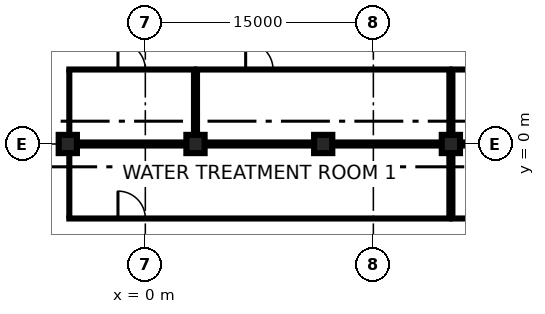
"""IFC4 building model, lengths in metres.
Left out: names, types, materials, properties, quantities, classifications, styles, units other than length and angle.
Written with IfcOpenShell. Run it as: python <this file> out.ifc"""

import sys

from ifc_helpers import new_model, si_unit, direction, frame, frame_2d, origin, origin_2d, place, context, subcontext, project, spatial, rectangle, extrude, element, fill, save


model = new_model("IFC4")
c1 = context("Model", 3, precision=1e-05, world=origin(), true_north=direction((0.0, 1.0)))
c2 = subcontext(c1, "Body", "Model", "MODEL_VIEW")
j1 = project(units=[si_unit("LENGTHUNIT", "METRE"), si_unit("PLANEANGLEUNIT", "RADIAN")], contexts=[c1])
p1 = place(None, origin())
s1 = spatial("IfcSite", under=j1, at=p1, CompositionType="ELEMENT")
p2 = place(p1, origin())
s2 = spatial("IfcBuilding", under=s1, at=p2, CompositionType="ELEMENT")
p3 = place(p2, frame((0.0, 0.0, -12.0)))
s3 = spatial("IfcBuildingStorey", under=s2, at=p3, CompositionType="ELEMENT", Elevation=-12.0)
for number, where, z_axis, x_axis in (
    (1, (-5.1, 0.0, 0.0), (0.0, 0.0, 1.0), (1.0, 0.0, 0.0)),
    (2, (3.3, 0.0, 0.0), (0.0, 0.0, 1.0), (1.0, 0.0, 0.0)),
    (3, (11.7, 0.0, 0.0), (0.0, 0.0, 1.0), (1.0, 0.0, 0.0)),
    (4, (20.1, 0.0, 0.0), (0.0, 0.0, 1.0), (1.0, 0.0, 0.0)),
):
    element("IfcColumn", number, at=place(p3, frame(where, z_axis=z_axis, x_axis=x_axis)), inside=s3, PredefinedType="COLUMN", context=c2, shape_type="SweptSolid", body=[
        extrude(rectangle(XDim=1.2, YDim=1.2, at=origin_2d()), origin(), (0.0, 0.0, 1.0), 4.4),
    ])
p4 = place(p3, frame((-5.1, -4.9, 0.0), z_axis=(0.0, 0.0, 1.0), x_axis=(1.0, 0.0, 0.0)))
e5 = element("IfcWall", 5, at=p4, inside=s3, PredefinedType="PARTITIONING", context=c2, shape_type="SweptSolid", body=[
    extrude(rectangle(XDim=25.2, YDim=0.2, at=frame_2d((12.6, 0.0))), origin(), (0.0, 0.0, 1.0), 4.4),
])
p5 = place(p4, frame((3.3, 0.0, 0.0)))
e6 = element("IfcOpeningElement", 6, at=p5, cuts=e5, PredefinedType="OPENING", context=c2, shape_type="SweptSolid", body=[
    extrude(rectangle(XDim=1.8, YDim=2.1, at=frame_2d((0.9, 1.05))), frame((0.0, 0.11, 0.0), z_axis=(0.0, -1.0, 0.0), x_axis=(1.0, 0.0, 0.0)), (0.0, 0.0, 1.0), 0.22),
])
p6 = place(p3, frame((-5.1, -0.1, 0.0), z_axis=(0.0, 0.0, 1.0), x_axis=(1.0, 0.0, 0.0)))
e7 = element("IfcWall", 7, at=p6, inside=s3, PredefinedType="PARTITIONING", context=c2, shape_type="SweptSolid", body=[
    extrude(rectangle(XDim=25.2, YDim=0.2, at=frame_2d((12.6, 0.0))), origin(), (0.0, 0.0, 1.0), 4.4),
])
for number, where, z_axis, x_axis in (
    (8, (-5.0, -4.8, 0.0), (0.0, 0.0, 1.0), (0.0, 1.0, 0.0)),
    (9, (20.0, -4.8, 0.0), (0.0, 0.0, 1.0), (0.0, 1.0, 0.0)),
):
    element("IfcWall", number, at=place(p3, frame(where, z_axis=z_axis, x_axis=x_axis)), inside=s3, PredefinedType="PARTITIONING", context=c2, shape_type="SweptSolid", body=[
        extrude(rectangle(XDim=4.2, YDim=0.2, at=frame_2d((2.1, 0.0))), origin(), (0.0, 0.0, 1.0), 4.4),
    ])
p7 = place(p3, frame((20.1, -4.9, 0.0), z_axis=(0.0, 0.0, 1.0), x_axis=(1.0, 0.0, 0.0)))
e10 = element("IfcWall", 10, at=p7, inside=s3, PredefinedType="PARTITIONING", context=c2, shape_type="SweptSolid", body=[
    extrude(rectangle(XDim=8.4, YDim=0.2, at=frame_2d((4.2, 0.0))), origin(), (0.0, 0.0, 1.0), 4.4),
])
p8 = place(p7, frame((3.3, 0.0, 0.0)))
e11 = element("IfcOpeningElement", 11, at=p8, cuts=e10, PredefinedType="OPENING", context=c2, shape_type="SweptSolid", body=[
    extrude(rectangle(XDim=1.8, YDim=2.1, at=frame_2d((0.9, 1.05))), frame((0.0, 0.11, 0.0), z_axis=(0.0, -1.0, 0.0), x_axis=(1.0, 0.0, 0.0)), (0.0, 0.0, 1.0), 0.22),
])
p9 = place(p3, frame((20.1, -0.1, 0.0), z_axis=(0.0, 0.0, 1.0), x_axis=(1.0, 0.0, 0.0)))
e12 = element("IfcWall", 12, at=p9, inside=s3, PredefinedType="PARTITIONING", context=c2, shape_type="SweptSolid", body=[
    extrude(rectangle(XDim=8.4, YDim=0.2, at=frame_2d((4.2, 0.0))), origin(), (0.0, 0.0, 1.0), 4.4),
])
p10 = place(p3, frame((20.2, -4.8, 0.0), z_axis=(0.0, 0.0, 1.0), x_axis=(0.0, 1.0, 0.0)))
e13 = element("IfcWall", 13, at=p10, inside=s3, PredefinedType="PARTITIONING", context=c2, shape_type="SweptSolid", body=[
    extrude(rectangle(XDim=4.2, YDim=0.2, at=frame_2d((2.1, 0.0))), origin(), (0.0, 0.0, 1.0), 4.4),
])
p11 = place(p3, frame((-5.1, 0.1, 0.0), z_axis=(0.0, 0.0, 1.0), x_axis=(1.0, 0.0, 0.0)))
e14 = element("IfcWall", 14, at=p11, inside=s3, PredefinedType="PARTITIONING", context=c2, shape_type="SweptSolid", body=[
    extrude(rectangle(XDim=8.4, YDim=0.2, at=frame_2d((4.2, 0.0))), origin(), (0.0, 0.0, 1.0), 4.4),
])
p12 = place(p3, frame((-5.1, 4.9, 0.0), z_axis=(0.0, 0.0, 1.0), x_axis=(1.0, 0.0, 0.0)))
e15 = element("IfcWall", 15, at=p12, inside=s3, PredefinedType="PARTITIONING", context=c2, shape_type="SweptSolid", body=[
    extrude(rectangle(XDim=8.4, YDim=0.2, at=frame_2d((4.2, 0.0))), origin(), (0.0, 0.0, 1.0), 4.4),
])
p13 = place(p12, frame((3.3, 0.0, 0.0)))
e16 = element("IfcOpeningElement", 16, at=p13, cuts=e15, PredefinedType="OPENING", context=c2, shape_type="SweptSolid", body=[
    extrude(rectangle(XDim=1.8, YDim=2.1, at=frame_2d((0.9, 1.05))), frame((0.0, 0.11, 0.0), z_axis=(0.0, -1.0, 0.0), x_axis=(1.0, 0.0, 0.0)), (0.0, 0.0, 1.0), 0.22),
])
for number, where, z_axis, x_axis in (
    (17, (-5.0, 0.6, 0.0), (0.0, 0.0, 1.0), (0.0, 1.0, 0.0)),
    (18, (3.2, 0.6, 0.0), (0.0, 0.0, 1.0), (0.0, 1.0, 0.0)),
):
    element("IfcWall", number, at=place(p3, frame(where, z_axis=z_axis, x_axis=x_axis)), inside=s3, PredefinedType="PARTITIONING", context=c2, shape_type="SweptSolid", body=[
        extrude(rectangle(XDim=4.2, YDim=0.2, at=frame_2d((2.1, 0.0))), origin(), (0.0, 0.0, 1.0), 4.4),
    ])
p14 = place(p3, frame((3.3, 0.1, 0.0), z_axis=(0.0, 0.0, 1.0), x_axis=(1.0, 0.0, 0.0)))
e19 = element("IfcWall", 19, at=p14, inside=s3, PredefinedType="PARTITIONING", context=c2, shape_type="SweptSolid", body=[
    extrude(rectangle(XDim=16.8, YDim=0.2, at=frame_2d((8.4, 0.0))), origin(), (0.0, 0.0, 1.0), 4.4),
])
p15 = place(p3, frame((3.3, 4.9, 0.0), z_axis=(0.0, 0.0, 1.0), x_axis=(1.0, 0.0, 0.0)))
e20 = element("IfcWall", 20, at=p15, inside=s3, PredefinedType="PARTITIONING", context=c2, shape_type="SweptSolid", body=[
    extrude(rectangle(XDim=16.8, YDim=0.2, at=frame_2d((8.4, 0.0))), origin(), (0.0, 0.0, 1.0), 4.4),
])
p16 = place(p15, frame((3.3, 0.0, 0.0)))
e21 = element("IfcOpeningElement", 21, at=p16, cuts=e20, PredefinedType="OPENING", context=c2, shape_type="SweptSolid", body=[
    extrude(rectangle(XDim=1.8, YDim=2.1, at=frame_2d((0.9, 1.05))), frame((0.0, 0.11, 0.0), z_axis=(0.0, -1.0, 0.0), x_axis=(1.0, 0.0, 0.0)), (0.0, 0.0, 1.0), 0.22),
])
for number, where, z_axis, x_axis in (
    (22, (3.4, 0.6, 0.0), (0.0, 0.0, 1.0), (0.0, 1.0, 0.0)),
    (23, (20.0, 0.6, 0.0), (0.0, 0.0, 1.0), (0.0, 1.0, 0.0)),
):
    element("IfcWall", number, at=place(p3, frame(where, z_axis=z_axis, x_axis=x_axis)), inside=s3, PredefinedType="PARTITIONING", context=c2, shape_type="SweptSolid", body=[
        extrude(rectangle(XDim=4.2, YDim=0.2, at=frame_2d((2.1, 0.0))), origin(), (0.0, 0.0, 1.0), 4.4),
    ])
p17 = place(p3, frame((20.1, 0.1, 0.0), z_axis=(0.0, 0.0, 1.0), x_axis=(1.0, 0.0, 0.0)))
e24 = element("IfcWall", 24, at=p17, inside=s3, PredefinedType="PARTITIONING", context=c2, shape_type="SweptSolid", body=[
    extrude(rectangle(XDim=8.4, YDim=0.2, at=frame_2d((4.2, 0.0))), origin(), (0.0, 0.0, 1.0), 4.4),
])
p18 = place(p3, frame((20.1, 4.9, 0.0), z_axis=(0.0, 0.0, 1.0), x_axis=(1.0, 0.0, 0.0)))
e25 = element("IfcWall", 25, at=p18, inside=s3, PredefinedType="PARTITIONING", context=c2, shape_type="SweptSolid", body=[
    extrude(rectangle(XDim=8.4, YDim=0.2, at=frame_2d((4.2, 0.0))), origin(), (0.0, 0.0, 1.0), 4.4),
])
p19 = place(p18, frame((3.3, 0.0, 0.0)))
e26 = element("IfcOpeningElement", 26, at=p19, cuts=e25, PredefinedType="OPENING", context=c2, shape_type="SweptSolid", body=[
    extrude(rectangle(XDim=1.8, YDim=2.1, at=frame_2d((0.9, 1.05))), frame((0.0, 0.11, 0.0), z_axis=(0.0, -1.0, 0.0), x_axis=(1.0, 0.0, 0.0)), (0.0, 0.0, 1.0), 0.22),
])
p20 = place(p3, frame((20.2, 0.6, 0.0), z_axis=(0.0, 0.0, 1.0), x_axis=(0.0, 1.0, 0.0)))
e27 = element("IfcWall", 27, at=p20, inside=s3, PredefinedType="PARTITIONING", context=c2, shape_type="SweptSolid", body=[
    extrude(rectangle(XDim=4.2, YDim=0.2, at=frame_2d((2.1, 0.0))), origin(), (0.0, 0.0, 1.0), 4.4),
])
p21 = place(p5, origin())
e28 = element("IfcDoor", 28, at=p21, inside=s3, OperationType="DOUBLE_DOOR_SINGLE_SWING", PredefinedType="DOOR", context=c2, shape_type="SweptSolid", body=[
    extrude(rectangle(XDim=1.8, YDim=2.1, at=frame_2d((0.9, 1.05))), frame((0.0, 0.025, 0.0), z_axis=(0.0, -1.0, 0.0), x_axis=(1.0, 0.0, 0.0)), (0.0, 0.0, 1.0), 0.05),
])
fill(e6, e28)
p22 = place(p13, origin())
e29 = element("IfcDoor", 29, at=p22, inside=s3, OperationType="DOUBLE_DOOR_SINGLE_SWING", PredefinedType="DOOR", context=c2, shape_type="SweptSolid", body=[
    extrude(rectangle(XDim=1.8, YDim=2.1, at=frame_2d((0.9, 1.05))), frame((0.0, 0.025, 0.0), z_axis=(0.0, -1.0, 0.0), x_axis=(1.0, 0.0, 0.0)), (0.0, 0.0, 1.0), 0.05),
])
fill(e16, e29)
p23 = place(p16, origin())
e30 = element("IfcDoor", 30, at=p23, inside=s3, OperationType="DOUBLE_DOOR_SINGLE_SWING", PredefinedType="DOOR", context=c2, shape_type="SweptSolid", body=[
    extrude(rectangle(XDim=1.8, YDim=2.1, at=frame_2d((0.9, 1.05))), frame((0.0, 0.025, 0.0), z_axis=(0.0, -1.0, 0.0), x_axis=(1.0, 0.0, 0.0)), (0.0, 0.0, 1.0), 0.05),
])
fill(e21, e30)
save(model, sys.argv[1])
